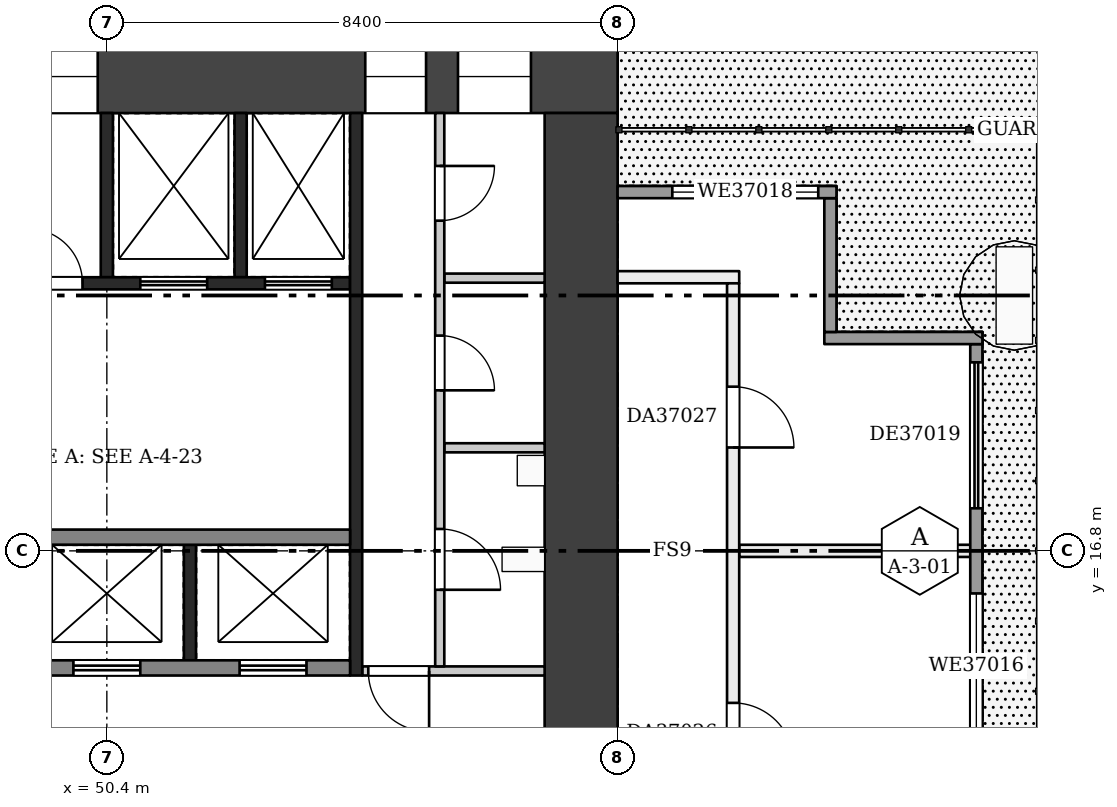
"""IFC4 building model, lengths in metres.
Left out: names, types, materials, properties, quantities, classifications, styles, units other than length and angle.
Written with IfcOpenShell. Run it as: python <this file> out.ifc"""

import sys

from ifc_helpers import new_model, si_unit, direction, frame, frame_2d, origin, place, context, subcontext, project, spatial, rectangle, extrude, element, fill, save


model = new_model("IFC4")
c1 = context("Model", 3, precision=1e-05, world=origin(), true_north=direction((0.0, 1.0)))
c2 = subcontext(c1, "Body", "Model", "MODEL_VIEW")
j1 = project(units=[si_unit("LENGTHUNIT", "METRE"), si_unit("PLANEANGLEUNIT", "RADIAN")], contexts=[c1])
p1 = place(None, origin())
s1 = spatial("IfcSite", under=j1, at=p1, CompositionType="ELEMENT")
p2 = place(p1, origin())
s2 = spatial("IfcBuilding", under=s1, at=p2, CompositionType="ELEMENT")
p3 = place(p2, frame((0.0, 0.0, 147.7)))
s3 = spatial("IfcBuildingStorey", under=s2, at=p3, CompositionType="ELEMENT", Elevation=147.7)
p4 = place(p3, frame((42.0, 24.6, 0.0), z_axis=(0.0, 0.0, 1.0), x_axis=(1.0, 0.0, 0.0)))
e1 = element("IfcWall", 1, at=p4, inside=s3, PredefinedType="SHEAR", context=c2, shape_type="SweptSolid", body=[
    extrude(rectangle(XDim=16.8, YDim=1.2, at=frame_2d((8.4, 0.0))), origin(), (0.0, 0.0, 1.0), 3.22),
])
p5 = place(p4, frame((1.8, 0.0, 0.5)))
e2 = element("IfcOpeningElement", 2, at=p5, cuts=e1, PredefinedType="OPENING", context=c2, shape_type="SweptSolid", body=[
    extrude(rectangle(XDim=1.8, YDim=2.4, at=frame_2d((0.9, 1.2))), frame((0.0, 0.61, 0.0), z_axis=(0.0, -1.0, 0.0), x_axis=(1.0, 0.0, 0.0)), (0.0, 0.0, 1.0), 1.22),
])
p6 = place(p4, frame((4.625, 0.0, 1.6)))
e3 = element("IfcOpeningElement", 3, at=p6, cuts=e1, PredefinedType="OPENING", context=c2, shape_type="SweptSolid", body=[
    extrude(rectangle(XDim=1.8, YDim=1.2, at=frame_2d((0.9, 0.6))), frame((0.0, 0.61, 0.0), z_axis=(0.0, -1.0, 0.0), x_axis=(1.0, 0.0, 0.0)), (0.0, 0.0, 1.0), 1.22),
])
p7 = place(p4, frame((7.05, 0.0, 1.6)))
e4 = element("IfcOpeningElement", 4, at=p7, cuts=e1, PredefinedType="OPENING", context=c2, shape_type="SweptSolid", body=[
    extrude(rectangle(XDim=1.2, YDim=1.2, at=frame_2d((0.6, 0.6))), frame((0.0, 0.61, 0.0), z_axis=(0.0, -1.0, 0.0), x_axis=(1.0, 0.0, 0.0)), (0.0, 0.0, 1.0), 1.22),
])
p8 = place(p4, frame((12.65, 0.0, 0.6)))
e5 = element("IfcOpeningElement", 5, at=p8, cuts=e1, PredefinedType="OPENING", context=c2, shape_type="SweptSolid", body=[
    extrude(rectangle(XDim=1.0, YDim=2.1, at=frame_2d((0.5, 1.05))), frame((0.0, 0.61, 0.0), z_axis=(0.0, -1.0, 0.0), x_axis=(1.0, 0.0, 0.0)), (0.0, 0.0, 1.0), 1.22),
])
p9 = place(p4, frame((14.175, 0.0, 1.6)))
e6 = element("IfcOpeningElement", 6, at=p9, cuts=e1, PredefinedType="OPENING", context=c2, shape_type="SweptSolid", body=[
    extrude(rectangle(XDim=1.2, YDim=1.2, at=frame_2d((0.6, 0.6))), frame((0.0, 0.61, 0.0), z_axis=(0.0, -1.0, 0.0), x_axis=(1.0, 0.0, 0.0)), (0.0, 0.0, 1.0), 1.22),
])
p10 = place(p3, frame((58.2, 9.6, 0.0), z_axis=(0.0, 0.0, 1.0), x_axis=(0.0, 1.0, 0.0)))
e7 = element("IfcWall", 7, at=p10, inside=s3, PredefinedType="SHEAR", context=c2, shape_type="SweptSolid", body=[
    extrude(rectangle(XDim=14.4, YDim=1.2, at=frame_2d((7.2, 0.0))), origin(), (0.0, 0.0, 1.0), 3.22),
])
p11 = place(p10, frame((2.1, 0.0, 0.0)))
e8 = element("IfcOpeningElement", 8, at=p11, cuts=e7, PredefinedType="OPENING", context=c2, shape_type="SweptSolid", body=[
    extrude(rectangle(XDim=1.8, YDim=2.1, at=frame_2d((0.9, 1.05))), frame((0.0, 0.61, 0.0), z_axis=(0.0, -1.0, 0.0), x_axis=(1.0, 0.0, 0.0)), (0.0, 0.0, 1.0), 1.22),
])
p12 = place(p3, frame((51.767, 15.0, 0.0), z_axis=(0.0, 0.0, 1.0), x_axis=(0.0, 1.0, 0.0)))
e9 = element("IfcWall", 9, at=p12, inside=s3, PredefinedType="SHEAR", context=c2, shape_type="SweptSolid", body=[
    extrude(rectangle(XDim=1.9, YDim=0.2, at=frame_2d((0.95, 0.0))), origin(), (0.0, 0.0, 1.0), 3.22),
])
p13 = place(p3, frame((46.4, 14.875, 0.0), z_axis=(0.0, 0.0, 1.0), x_axis=(1.0, 0.0, 0.0)))
e10 = element("IfcWall", 10, at=p13, inside=s3, PredefinedType="SHEAR", context=c2, shape_type="SweptSolid", body=[
    extrude(rectangle(XDim=8.0, YDim=0.25, at=frame_2d((4.0, 0.0))), origin(), (0.0, 0.0, 1.0), 3.22),
])
p14 = place(p13, frame((0.717, 0.0, 0.0)))
e11 = element("IfcOpeningElement", 11, at=p14, cuts=e10, PredefinedType="OPENING", context=c2, shape_type="SweptSolid", body=[
    extrude(rectangle(XDim=1.1, YDim=2.1, at=frame_2d((0.55, 1.05))), frame((0.0, 0.135, 0.0), z_axis=(0.0, -1.0, 0.0), x_axis=(1.0, 0.0, 0.0)), (0.0, 0.0, 1.0), 0.27),
])
p15 = place(p13, frame((3.45, 0.0, 0.0)))
e12 = element("IfcOpeningElement", 12, at=p15, cuts=e10, PredefinedType="OPENING", context=c2, shape_type="SweptSolid", body=[
    extrude(rectangle(XDim=1.1, YDim=2.1, at=frame_2d((0.55, 1.05))), frame((0.0, 0.135, 0.0), z_axis=(0.0, -1.0, 0.0), x_axis=(1.0, 0.0, 0.0)), (0.0, 0.0, 1.0), 0.27),
])
p16 = place(p13, frame((6.183, 0.0, 0.0)))
e13 = element("IfcOpeningElement", 13, at=p16, cuts=e10, PredefinedType="OPENING", context=c2, shape_type="SweptSolid", body=[
    extrude(rectangle(XDim=1.1, YDim=2.1, at=frame_2d((0.55, 1.05))), frame((0.0, 0.135, 0.0), z_axis=(0.0, -1.0, 0.0), x_axis=(1.0, 0.0, 0.0)), (0.0, 0.0, 1.0), 0.27),
])
p17 = place(p3, frame((46.4, 17.025, 0.0), z_axis=(0.0, 0.0, 1.0), x_axis=(1.0, 0.0, 0.0)))
e14 = element("IfcWall", 14, at=p17, inside=s3, PredefinedType="SHEAR", context=c2, shape_type="SweptSolid", body=[
    extrude(rectangle(XDim=8.0, YDim=0.25, at=frame_2d((4.0, 0.0))), origin(), (0.0, 0.0, 1.0), 3.22),
])
for number, where, z_axis, x_axis in (
    (15, (50.4, 21.3, 0.0), (0.0, 0.0, 1.0), (0.0, 1.0, 0.0)),
    (16, (52.6, 21.3, 0.0), (0.0, 0.0, 1.0), (0.0, 1.0, 0.0)),
):
    element("IfcWall", number, at=place(p3, frame(where, z_axis=z_axis, x_axis=x_axis)), inside=s3, PredefinedType="SHEAR", context=c2, shape_type="SweptSolid", body=[
        extrude(rectangle(XDim=2.7, YDim=0.2, at=frame_2d((1.35, 0.0))), origin(), (0.0, 0.0, 1.0), 3.22),
    ])
p18 = place(p3, frame((46.4, 21.2, 0.0), z_axis=(0.0, 0.0, 1.0), x_axis=(1.0, 0.0, 0.0)))
e17 = element("IfcWall", 17, at=p18, inside=s3, PredefinedType="SHEAR", context=c2, shape_type="SweptSolid", body=[
    extrude(rectangle(XDim=8.0, YDim=0.2, at=frame_2d((4.0, 0.0))), origin(), (0.0, 0.0, 1.0), 3.22),
])
p19 = place(p18, frame((0.675, 0.0, 0.0)))
e18 = element("IfcOpeningElement", 18, at=p19, cuts=e17, PredefinedType="OPENING", context=c2, shape_type="SweptSolid", body=[
    extrude(rectangle(XDim=0.9, YDim=2.1, at=frame_2d((0.45, 1.05))), frame((0.0, 0.11, 0.0), z_axis=(0.0, -1.0, 0.0), x_axis=(1.0, 0.0, 0.0)), (0.0, 0.0, 1.0), 0.22),
])
p20 = place(p18, frame((2.7, 0.0, 0.0)))
e19 = element("IfcOpeningElement", 19, at=p20, cuts=e17, PredefinedType="OPENING", context=c2, shape_type="SweptSolid", body=[
    extrude(rectangle(XDim=0.9, YDim=2.1, at=frame_2d((0.45, 1.05))), frame((0.0, 0.11, 0.0), z_axis=(0.0, -1.0, 0.0), x_axis=(1.0, 0.0, 0.0)), (0.0, 0.0, 1.0), 0.22),
])
p21 = place(p18, frame((4.55, 0.0, 0.0)))
e20 = element("IfcOpeningElement", 20, at=p21, cuts=e17, PredefinedType="OPENING", context=c2, shape_type="SweptSolid", body=[
    extrude(rectangle(XDim=1.1, YDim=2.1, at=frame_2d((0.55, 1.05))), frame((0.0, 0.11, 0.0), z_axis=(0.0, -1.0, 0.0), x_axis=(1.0, 0.0, 0.0)), (0.0, 0.0, 1.0), 0.22),
])
p22 = place(p18, frame((6.6, 0.0, 0.0)))
e21 = element("IfcOpeningElement", 21, at=p22, cuts=e17, PredefinedType="OPENING", context=c2, shape_type="SweptSolid", body=[
    extrude(rectangle(XDim=1.1, YDim=2.1, at=frame_2d((0.55, 1.05))), frame((0.0, 0.11, 0.0), z_axis=(0.0, -1.0, 0.0), x_axis=(1.0, 0.0, 0.0)), (0.0, 0.0, 1.0), 0.22),
])
p23 = place(p3, frame((54.5, 14.75, 0.0), z_axis=(0.0, 0.0, 1.0), x_axis=(0.0, 1.0, 0.0)))
e22 = element("IfcWall", 22, at=p23, inside=s3, PredefinedType="SHEAR", context=c2, shape_type="SweptSolid", body=[
    extrude(rectangle(XDim=9.25, YDim=0.2, at=frame_2d((4.625, 0.0))), origin(), (0.0, 0.0, 1.0), 3.22),
])
p24 = place(p3, frame((54.6, 14.825, 0.0), z_axis=(0.0, 0.0, 1.0), x_axis=(1.0, 0.0, 0.0)))
e23 = element("IfcWall", 23, at=p24, inside=s3, PredefinedType="PARTITIONING", context=c2, shape_type="SweptSolid", body=[
    extrude(rectangle(XDim=3.0, YDim=0.15, at=frame_2d((1.5, 0.0))), origin(), (0.0, 0.0, 1.0), 3.22),
])
p25 = place(p24, frame((0.1, 0.0, 0.0)))
e24 = element("IfcOpeningElement", 24, at=p25, cuts=e23, PredefinedType="OPENING", context=c2, shape_type="SweptSolid", body=[
    extrude(rectangle(XDim=1.0, YDim=2.1, at=frame_2d((0.5, 1.05))), frame((0.0, 0.085, 0.0), z_axis=(0.0, -1.0, 0.0), x_axis=(1.0, 0.0, 0.0)), (0.0, 0.0, 1.0), 0.17),
])
for number, where, z_axis, x_axis in (
    (25, (55.95, 18.495, 0.0), (0.0, 0.0, 1.0), (1.0, 0.0, 0.0)),
    (26, (55.95, 21.285, 0.0), (0.0, 0.0, 1.0), (1.0, 0.0, 0.0)),
):
    element("IfcWall", number, at=place(p3, frame(where, z_axis=z_axis, x_axis=x_axis)), inside=s3, PredefinedType="PARTITIONING", context=c2, shape_type="SweptSolid", body=[
        extrude(rectangle(XDim=1.65, YDim=0.15, at=frame_2d((0.825, 0.0))), origin(), (0.0, 0.0, 1.0), 3.22),
    ])
p26 = place(p3, frame((55.875, 14.9, 0.0), z_axis=(0.0, 0.0, 1.0), x_axis=(0.0, 1.0, 0.0)))
e27 = element("IfcWall", 27, at=p26, inside=s3, PredefinedType="PARTITIONING", context=c2, shape_type="SweptSolid", body=[
    extrude(rectangle(XDim=9.1, YDim=0.15, at=frame_2d((4.55, 0.0))), origin(), (0.0, 0.0, 1.0), 3.22),
])
p27 = place(p26, frame((1.26, 0.0, 0.0)))
e28 = element("IfcOpeningElement", 28, at=p27, cuts=e27, PredefinedType="OPENING", context=c2, shape_type="SweptSolid", body=[
    extrude(rectangle(XDim=1.0, YDim=2.1, at=frame_2d((0.5, 1.05))), frame((0.0, 0.085, 0.0), z_axis=(0.0, -1.0, 0.0), x_axis=(1.0, 0.0, 0.0)), (0.0, 0.0, 1.0), 0.17),
])
p28 = place(p26, frame((4.54, 0.0, 0.0)))
e29 = element("IfcOpeningElement", 29, at=p28, cuts=e27, PredefinedType="OPENING", context=c2, shape_type="SweptSolid", body=[
    extrude(rectangle(XDim=0.9, YDim=2.1, at=frame_2d((0.45, 1.05))), frame((0.0, 0.085, 0.0), z_axis=(0.0, -1.0, 0.0), x_axis=(1.0, 0.0, 0.0)), (0.0, 0.0, 1.0), 0.17),
])
p29 = place(p26, frame((7.33, 0.0, 0.0)))
e30 = element("IfcOpeningElement", 30, at=p29, cuts=e27, PredefinedType="OPENING", context=c2, shape_type="SweptSolid", body=[
    extrude(rectangle(XDim=0.9, YDim=2.1, at=frame_2d((0.45, 1.05))), frame((0.0, 0.085, 0.0), z_axis=(0.0, -1.0, 0.0), x_axis=(1.0, 0.0, 0.0)), (0.0, 0.0, 1.0), 0.17),
])
p30 = place(p3, frame((60.8, 16.8, 0.0), z_axis=(0.0, 0.0, 1.0), x_axis=(1.0, 0.0, 0.0)))
e31 = element("IfcWall", 31, at=p30, inside=s3, PredefinedType="PARTITIONING", context=c2, shape_type="SweptSolid", body=[
    extrude(rectangle(XDim=3.9, YDim=0.2, at=frame_2d((1.95, 0.0))), origin(), (0.0, 0.0, 1.0), 3.22),
])
p31 = place(p3, frame((58.8, 21.3, 0.0), z_axis=(0.0, 0.0, 1.0), x_axis=(1.0, 0.0, 0.0)))
e32 = element("IfcWall", 32, at=p31, inside=s3, PredefinedType="PARTITIONING", context=c2, shape_type="SweptSolid", body=[
    extrude(rectangle(XDim=2.0, YDim=0.2, at=frame_2d((1.0, 0.0))), origin(), (0.0, 0.0, 1.0), 3.22),
])
p32 = place(p3, frame((60.7, 10.9, 0.0), z_axis=(0.0, 0.0, 1.0), x_axis=(0.0, 1.0, 0.0)))
e33 = element("IfcWall", 33, at=p32, inside=s3, PredefinedType="PARTITIONING", context=c2, shape_type="SweptSolid", body=[
    extrude(rectangle(XDim=10.3, YDim=0.2, at=frame_2d((5.15, 0.0))), origin(), (0.0, 0.0, 1.0), 3.22),
])
p33 = place(p32, frame((2.4, 0.0, 0.0)))
e34 = element("IfcOpeningElement", 34, at=p33, cuts=e33, PredefinedType="OPENING", context=c2, shape_type="SweptSolid", body=[
    extrude(rectangle(XDim=1.0, YDim=2.1, at=frame_2d((0.5, 1.05))), frame((0.0, 0.11, 0.0), z_axis=(0.0, -1.0, 0.0), x_axis=(1.0, 0.0, 0.0)), (0.0, 0.0, 1.0), 0.22),
])
p34 = place(p32, frame((7.6, 0.0, 0.0)))
e35 = element("IfcOpeningElement", 35, at=p34, cuts=e33, PredefinedType="OPENING", context=c2, shape_type="SweptSolid", body=[
    extrude(rectangle(XDim=1.0, YDim=2.1, at=frame_2d((0.5, 1.05))), frame((0.0, 0.11, 0.0), z_axis=(0.0, -1.0, 0.0), x_axis=(1.0, 0.0, 0.0)), (0.0, 0.0, 1.0), 0.22),
])
p35 = place(p3, frame((64.7, 13.4, 0.0), z_axis=(0.0, 0.0, 1.0), x_axis=(0.0, 1.0, 0.0)))
e36 = element("IfcWall", 36, at=p35, inside=s3, PredefinedType="SOLIDWALL", context=c2, shape_type="SweptSolid", body=[
    extrude(rectangle(XDim=6.8, YDim=0.2, at=frame_2d((3.4, 0.0))), origin(), (0.0, 0.0, 1.0), 3.22),
])
p36 = place(p35, frame((0.3, 0.0, 0.9)))
e37 = element("IfcOpeningElement", 37, at=p36, cuts=e36, PredefinedType="OPENING", context=c2, shape_type="SweptSolid", body=[
    extrude(rectangle(XDim=2.4, YDim=1.5, at=frame_2d((1.2, 0.75))), frame((0.0, 0.11, 0.0), z_axis=(0.0, -1.0, 0.0), x_axis=(1.0, 0.0, 0.0)), (0.0, 0.0, 1.0), 0.22),
])
p37 = place(p35, frame((4.1, 0.0, 0.0)))
e38 = element("IfcOpeningElement", 38, at=p37, cuts=e36, PredefinedType="OPENING", context=c2, shape_type="SweptSolid", body=[
    extrude(rectangle(XDim=2.4, YDim=2.2, at=frame_2d((1.2, 1.1))), frame((0.0, 0.11, 0.0), z_axis=(0.0, -1.0, 0.0), x_axis=(1.0, 0.0, 0.0)), (0.0, 0.0, 1.0), 0.22),
])
p38 = place(p3, frame((64.8, 20.3, 0.0), z_axis=(0.0, 0.0, 1.0), x_axis=(-1.0, 0.0, 0.0)))
e39 = element("IfcWall", 39, at=p38, inside=s3, PredefinedType="SOLIDWALL", context=c2, shape_type="SweptSolid", body=[
    extrude(rectangle(XDim=2.6, YDim=0.2, at=frame_2d((1.3, 0.0))), origin(), (0.0, 0.0, 1.0), 3.22),
])
p39 = place(p3, frame((62.3, 20.4, 0.0), z_axis=(0.0, 0.0, 1.0), x_axis=(0.0, 1.0, 0.0)))
e40 = element("IfcWall", 40, at=p39, inside=s3, PredefinedType="SOLIDWALL", context=c2, shape_type="SweptSolid", body=[
    extrude(rectangle(XDim=2.2, YDim=0.2, at=frame_2d((1.1, 0.0))), origin(), (0.0, 0.0, 1.0), 3.22),
])
p40 = place(p3, frame((62.4, 22.7, 0.0), z_axis=(0.0, 0.0, 1.0), x_axis=(-1.0, 0.0, 0.0)))
e41 = element("IfcWall", 41, at=p40, inside=s3, PredefinedType="SOLIDWALL", context=c2, shape_type="SweptSolid", body=[
    extrude(rectangle(XDim=3.6, YDim=0.2, at=frame_2d((1.8, 0.0))), origin(), (0.0, 0.0, 1.0), 3.22),
])
p41 = place(p40, frame((0.3, 0.0, 0.9)))
e42 = element("IfcOpeningElement", 42, at=p41, cuts=e41, PredefinedType="OPENING", context=c2, shape_type="SweptSolid", body=[
    extrude(rectangle(XDim=2.4, YDim=1.5, at=frame_2d((1.2, 0.75))), frame((0.0, 0.11, 0.0), z_axis=(0.0, -1.0, 0.0), x_axis=(1.0, 0.0, 0.0)), (0.0, 0.0, 1.0), 0.22),
])
p42 = place(p15, origin())
e43 = element("IfcDoor", 43, at=p42, inside=s3, OperationType="DOUBLE_DOOR_SLIDING", PredefinedType="DOOR", context=c2, shape_type="SweptSolid", body=[
    extrude(rectangle(XDim=1.1, YDim=2.1, at=frame_2d((0.55, 1.05))), frame((0.0, 0.025, 0.0), z_axis=(0.0, -1.0, 0.0), x_axis=(1.0, 0.0, 0.0)), (0.0, 0.0, 1.0), 0.05),
])
fill(e12, e43)
p43 = place(p16, origin())
e44 = element("IfcDoor", 44, at=p43, inside=s3, OperationType="DOUBLE_DOOR_SLIDING", PredefinedType="DOOR", context=c2, shape_type="SweptSolid", body=[
    extrude(rectangle(XDim=1.1, YDim=2.1, at=frame_2d((0.55, 1.05))), frame((0.0, 0.025, 0.0), z_axis=(0.0, -1.0, 0.0), x_axis=(1.0, 0.0, 0.0)), (0.0, 0.0, 1.0), 0.05),
])
fill(e13, e44)
p44 = place(p20, origin())
e45 = element("IfcDoor", 45, at=p44, inside=s3, OperationType="SINGLE_SWING_LEFT", PredefinedType="DOOR", context=c2, shape_type="SweptSolid", body=[
    extrude(rectangle(XDim=0.9, YDim=2.1, at=frame_2d((0.45, 1.05))), frame((0.0, 0.025, 0.0), z_axis=(0.0, -1.0, 0.0), x_axis=(1.0, 0.0, 0.0)), (0.0, 0.0, 1.0), 0.05),
])
fill(e19, e45)
p45 = place(p21, origin())
e46 = element("IfcDoor", 46, at=p45, inside=s3, OperationType="DOUBLE_DOOR_SLIDING", PredefinedType="DOOR", context=c2, shape_type="SweptSolid", body=[
    extrude(rectangle(XDim=1.1, YDim=2.1, at=frame_2d((0.55, 1.05))), frame((0.0, 0.025, 0.0), z_axis=(0.0, -1.0, 0.0), x_axis=(1.0, 0.0, 0.0)), (0.0, 0.0, 1.0), 0.05),
])
fill(e20, e46)
p46 = place(p22, origin())
e47 = element("IfcDoor", 47, at=p46, inside=s3, OperationType="DOUBLE_DOOR_SLIDING", PredefinedType="DOOR", context=c2, shape_type="SweptSolid", body=[
    extrude(rectangle(XDim=1.1, YDim=2.1, at=frame_2d((0.55, 1.05))), frame((0.0, 0.025, 0.0), z_axis=(0.0, -1.0, 0.0), x_axis=(1.0, 0.0, 0.0)), (0.0, 0.0, 1.0), 0.05),
])
fill(e21, e47)
p47 = place(p25, frame((1.0, 0.0, 0.0), z_axis=(0.0, 0.0, 1.0), x_axis=(-1.0, 0.0, 0.0)))
e48 = element("IfcDoor", 48, at=p47, inside=s3, OperationType="SINGLE_SWING_LEFT", PredefinedType="DOOR", context=c2, shape_type="SweptSolid", body=[
    extrude(rectangle(XDim=1.0, YDim=2.1, at=frame_2d((0.5, 1.05))), frame((0.0, 0.025, 0.0), z_axis=(0.0, -1.0, 0.0), x_axis=(1.0, 0.0, 0.0)), (0.0, 0.0, 1.0), 0.05),
])
fill(e24, e48)
p48 = place(p27, frame((1.0, 0.0, 0.0), z_axis=(0.0, 0.0, 1.0), x_axis=(-1.0, 0.0, 0.0)))
e49 = element("IfcDoor", 49, at=p48, inside=s3, OperationType="SINGLE_SWING_RIGHT", PredefinedType="DOOR", context=c2, shape_type="SweptSolid", body=[
    extrude(rectangle(XDim=1.0, YDim=2.1, at=frame_2d((0.5, 1.05))), frame((0.0, 0.025, 0.0), z_axis=(0.0, -1.0, 0.0), x_axis=(1.0, 0.0, 0.0)), (0.0, 0.0, 1.0), 0.05),
])
fill(e28, e49)
p49 = place(p28, frame((0.9, 0.0, 0.0), z_axis=(0.0, 0.0, 1.0), x_axis=(-1.0, 0.0, 0.0)))
e50 = element("IfcDoor", 50, at=p49, inside=s3, OperationType="SINGLE_SWING_RIGHT", PredefinedType="DOOR", context=c2, shape_type="SweptSolid", body=[
    extrude(rectangle(XDim=0.9, YDim=2.1, at=frame_2d((0.45, 1.05))), frame((0.0, 0.025, 0.0), z_axis=(0.0, -1.0, 0.0), x_axis=(1.0, 0.0, 0.0)), (0.0, 0.0, 1.0), 0.05),
])
fill(e29, e50)
p50 = place(p29, frame((0.9, 0.0, 0.0), z_axis=(0.0, 0.0, 1.0), x_axis=(-1.0, 0.0, 0.0)))
e51 = element("IfcDoor", 51, at=p50, inside=s3, OperationType="SINGLE_SWING_LEFT", PredefinedType="DOOR", context=c2, shape_type="SweptSolid", body=[
    extrude(rectangle(XDim=0.9, YDim=2.1, at=frame_2d((0.45, 1.05))), frame((0.0, 0.025, 0.0), z_axis=(0.0, -1.0, 0.0), x_axis=(1.0, 0.0, 0.0)), (0.0, 0.0, 1.0), 0.05),
])
fill(e30, e51)
p51 = place(p7, origin())
e52 = element("IfcWindow", 52, at=p51, inside=s3, PartitioningType="SINGLE_PANEL", PredefinedType="WINDOW", context=c2, shape_type="SweptSolid", body=[
    extrude(rectangle(XDim=1.2, YDim=1.2, at=frame_2d((0.6, 0.6))), frame((0.0, 0.03, 0.0), z_axis=(0.0, -1.0, 0.0), x_axis=(1.0, 0.0, 0.0)), (0.0, 0.0, 1.0), 0.06),
])
fill(e4, e52)
p52 = place(p8, origin())
e53 = element("IfcWindow", 53, at=p52, inside=s3, PartitioningType="SINGLE_PANEL", PredefinedType="WINDOW", context=c2, shape_type="SweptSolid", body=[
    extrude(rectangle(XDim=1.0, YDim=2.1, at=frame_2d((0.5, 1.05))), frame((0.0, 0.03, 0.0), z_axis=(0.0, -1.0, 0.0), x_axis=(1.0, 0.0, 0.0)), (0.0, 0.0, 1.0), 0.06),
])
fill(e5, e53)
p53 = place(p9, origin())
e54 = element("IfcWindow", 54, at=p53, inside=s3, PartitioningType="SINGLE_PANEL", PredefinedType="WINDOW", context=c2, shape_type="SweptSolid", body=[
    extrude(rectangle(XDim=1.2, YDim=1.2, at=frame_2d((0.6, 0.6))), frame((0.0, 0.03, 0.0), z_axis=(0.0, -1.0, 0.0), x_axis=(1.0, 0.0, 0.0)), (0.0, 0.0, 1.0), 0.06),
])
fill(e6, e54)
p54 = place(p33, frame((1.0, 0.0, 0.0), z_axis=(0.0, 0.0, 1.0), x_axis=(-1.0, 0.0, 0.0)))
e55 = element("IfcDoor", 55, at=p54, inside=s3, OperationType="SINGLE_SWING_RIGHT", PredefinedType="DOOR", context=c2, shape_type="SweptSolid", body=[
    extrude(rectangle(XDim=1.0, YDim=2.1, at=frame_2d((0.5, 1.05))), frame((0.0, 0.025, 0.0), z_axis=(0.0, -1.0, 0.0), x_axis=(1.0, 0.0, 0.0)), (0.0, 0.0, 1.0), 0.05),
])
fill(e34, e55)
p55 = place(p34, frame((1.0, 0.0, 0.0), z_axis=(0.0, 0.0, 1.0), x_axis=(-1.0, 0.0, 0.0)))
e56 = element("IfcDoor", 56, at=p55, inside=s3, OperationType="SINGLE_SWING_RIGHT", PredefinedType="DOOR", context=c2, shape_type="SweptSolid", body=[
    extrude(rectangle(XDim=1.0, YDim=2.1, at=frame_2d((0.5, 1.05))), frame((0.0, 0.025, 0.0), z_axis=(0.0, -1.0, 0.0), x_axis=(1.0, 0.0, 0.0)), (0.0, 0.0, 1.0), 0.05),
])
fill(e35, e56)
p56 = place(p36, origin())
e57 = element("IfcWindow", 57, at=p56, inside=s3, PartitioningType="SINGLE_PANEL", PredefinedType="WINDOW", context=c2, shape_type="SweptSolid", body=[
    extrude(rectangle(XDim=2.4, YDim=1.5, at=frame_2d((1.2, 0.75))), frame((0.0, 0.03, 0.0), z_axis=(0.0, -1.0, 0.0), x_axis=(1.0, 0.0, 0.0)), (0.0, 0.0, 1.0), 0.06),
])
fill(e37, e57)
p57 = place(p41, origin())
e58 = element("IfcWindow", 58, at=p57, inside=s3, PartitioningType="SINGLE_PANEL", PredefinedType="WINDOW", context=c2, shape_type="SweptSolid", body=[
    extrude(rectangle(XDim=2.4, YDim=1.5, at=frame_2d((1.2, 0.75))), frame((0.0, 0.03, 0.0), z_axis=(0.0, -1.0, 0.0), x_axis=(1.0, 0.0, 0.0)), (0.0, 0.0, 1.0), 0.06),
])
fill(e42, e58)
p58 = place(p37, origin())
e59 = element("IfcDoor", 59, at=p58, inside=s3, OperationType="DOUBLE_DOOR_SLIDING", PredefinedType="DOOR", context=c2, shape_type="SweptSolid", body=[
    extrude(rectangle(XDim=2.4, YDim=2.2, at=frame_2d((1.2, 1.1))), frame((0.0, 0.025, 0.0), z_axis=(0.0, -1.0, 0.0), x_axis=(1.0, 0.0, 0.0)), (0.0, 0.0, 1.0), 0.05),
])
fill(e38, e59)
save(model, sys.argv[1])
